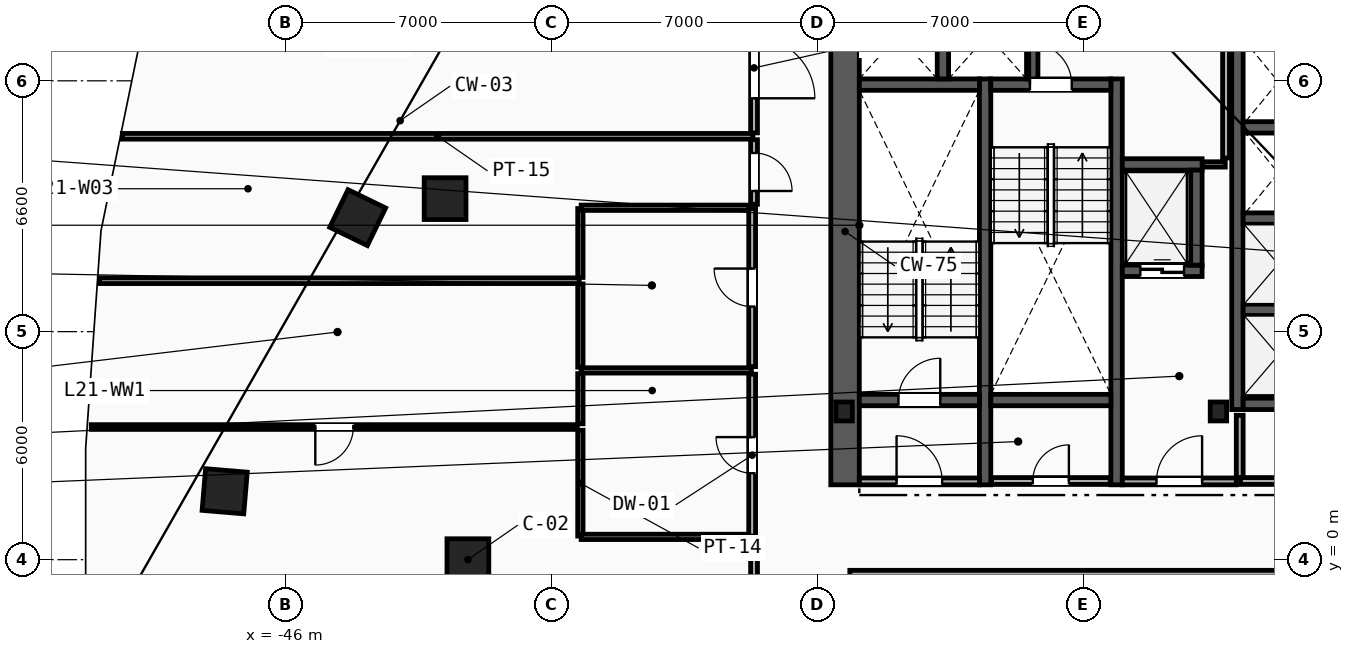
"""IFC4 building model, lengths in metres.
Left out: names, types, materials, properties, quantities, classifications, styles, units other than length and angle.
Written with IfcOpenShell. Run it as: python <this file> out.ifc"""

import sys

from ifc_helpers import new_model, si_unit, direction, frame, frame_2d, origin, origin_2d, place, context, subcontext, project, spatial, rectangle, i_section, extrude, element, fill, save


model = new_model("IFC4")
c1 = context("Model", 3, precision=1e-05, world=origin(), true_north=direction((0.0, 1.0)))
c2 = subcontext(c1, "Body", "Model", "MODEL_VIEW")
j1 = project(units=[si_unit("LENGTHUNIT", "METRE"), si_unit("PLANEANGLEUNIT", "RADIAN")], contexts=[c1])
p1 = place(None, origin())
s1 = spatial("IfcSite", under=j1, at=p1, CompositionType="ELEMENT")
p2 = place(p1, origin())
s2 = spatial("IfcBuilding", under=s1, at=p2, CompositionType="ELEMENT")
p3 = place(p2, frame((0.0, 0.0, 85.4)))
s3 = spatial("IfcBuildingStorey", under=s2, at=p3, CompositionType="ELEMENT", Elevation=85.4)
for number, where, z_axis, x_axis in (
    (1, (-31.3, 3.9, 0.0), (0.0, 0.0, 1.0), (1.0, 0.0, 0.0)),
    (2, (-21.45, 3.9, 0.0), (0.0, 0.0, 1.0), (1.0, 0.0, 0.0)),
):
    element("IfcColumn", number, at=place(p3, frame(where, z_axis=z_axis, x_axis=x_axis)), inside=s3, PredefinedType="COLUMN", context=c2, shape_type="SweptSolid", body=[
        extrude(i_section(OverallWidth=0.432, OverallDepth=0.498, WebThickness=0.056, FlangeThickness=0.089, FilletRadius=0.018, at=origin_2d()), origin(), (0.0, 0.0, 1.0), 3.6),
    ])
for number, where, z_axis, x_axis in (
    (3, (-41.2, 0.0, 0.0), (0.0, 0.0, 1.0), (1.0, 0.0, 0.0)),
    (4, (-41.8, 9.5, 0.0), (0.0, 0.0, 1.0), (1.0, 0.0, 0.0)),
    (5, (-44.1, 9.0, 0.0), (0.0, 0.0, 1.0), (-0.437, -0.899, 0.0)),
    (6, (-47.6, 1.8, 0.0), (0.0, 0.0, 1.0), (-0.084, -0.997, 0.0)),
):
    element("IfcColumn", number, at=place(p3, frame(where, z_axis=z_axis, x_axis=x_axis)), inside=s3, PredefinedType="COLUMN", context=c2, shape_type="SweptSolid", body=[
        extrude(rectangle(XDim=1.1, YDim=1.1, at=origin_2d()), origin(), (0.0, 0.0, 1.0), 3.6),
    ])
p4 = place(p3, frame((-31.275, 1.97, 0.0), z_axis=(0.0, 0.0, 1.0), x_axis=(0.0, 1.0, 0.0)))
e7 = element("IfcWall", 7, at=p4, inside=s3, PredefinedType="SHEAR", context=c2, shape_type="SweptSolid", body=[
    extrude(rectangle(XDim=13.33, YDim=0.75, at=frame_2d((6.665, 0.0))), origin(), (0.0, 0.0, 1.0), 3.3),
])
for number, where, z_axis, x_axis in (
    (8, (-27.59, 1.97, 0.0), (0.0, 0.0, 1.0), (0.0, 1.0, 0.0)),
    (9, (-24.13, 1.97, 0.0), (0.0, 0.0, 1.0), (0.0, 1.0, 0.0)),
):
    element("IfcWall", number, at=place(p3, frame(where, z_axis=z_axis, x_axis=x_axis)), inside=s3, PredefinedType="SHEAR", context=c2, shape_type="SweptSolid", body=[
        extrude(rectangle(XDim=10.68, YDim=0.3, at=frame_2d((5.34, 0.0))), origin(), (0.0, 0.0, 1.0), 3.3),
    ])
p5 = place(p3, frame((-30.9, 4.2, 0.0), z_axis=(0.0, 0.0, 1.0), x_axis=(1.0, 0.0, 0.0)))
e10 = element("IfcWall", 10, at=p5, inside=s3, PredefinedType="SHEAR", context=c2, shape_type="SweptSolid", body=[
    extrude(rectangle(XDim=3.16, YDim=0.3, at=frame_2d((1.58, 0.0))), origin(), (0.0, 0.0, 1.0), 3.3),
])
p6 = place(p5, frame((1.03, 0.0, 0.0)))
e11 = element("IfcOpeningElement", 11, at=p6, cuts=e10, PredefinedType="OPENING", context=c2, shape_type="SweptSolid", body=[
    extrude(rectangle(XDim=1.1, YDim=2.15, at=frame_2d((0.55, 1.075))), frame((0.0, 0.16, 0.0), z_axis=(0.0, -1.0, 0.0), x_axis=(1.0, 0.0, 0.0)), (0.0, 0.0, 1.0), 0.32),
])
p7 = place(p3, frame((-30.9, 12.5, 0.0), z_axis=(0.0, 0.0, 1.0), x_axis=(1.0, 0.0, 0.0)))
e12 = element("IfcWall", 12, at=p7, inside=s3, PredefinedType="SHEAR", context=c2, shape_type="SweptSolid", body=[
    extrude(rectangle(XDim=3.16, YDim=0.3, at=frame_2d((1.58, 0.0))), origin(), (0.0, 0.0, 1.0), 3.3),
])
p8 = place(p3, frame((-27.44, 12.5, 0.0), z_axis=(0.0, 0.0, 1.0), x_axis=(1.0, 0.0, 0.0)))
e13 = element("IfcWall", 13, at=p8, inside=s3, PredefinedType="SHEAR", context=c2, shape_type="SweptSolid", body=[
    extrude(rectangle(XDim=3.16, YDim=0.3, at=frame_2d((1.58, 0.0))), origin(), (0.0, 0.0, 1.0), 3.3),
])
p9 = place(p8, frame((1.03, 0.0, 0.0)))
e14 = element("IfcOpeningElement", 14, at=p9, cuts=e13, PredefinedType="OPENING", context=c2, shape_type="SweptSolid", body=[
    extrude(rectangle(XDim=1.1, YDim=2.15, at=frame_2d((0.55, 1.075))), frame((0.0, 0.16, 0.0), z_axis=(0.0, -1.0, 0.0), x_axis=(1.0, 0.0, 0.0)), (0.0, 0.0, 1.0), 0.32),
])
p10 = place(p3, frame((-27.44, 4.2, 0.0), z_axis=(0.0, 0.0, 1.0), x_axis=(1.0, 0.0, 0.0)))
e15 = element("IfcWall", 15, at=p10, inside=s3, PredefinedType="SHEAR", context=c2, shape_type="SweptSolid", body=[
    extrude(rectangle(XDim=3.16, YDim=0.3, at=frame_2d((1.58, 0.0))), origin(), (0.0, 0.0, 1.0), 3.3),
])
p11 = place(p3, frame((-20.89, 2.15, 0.0), z_axis=(0.0, 0.0, 1.0), x_axis=(0.0, 1.0, 0.0)))
e16 = element("IfcWall", 16, at=p11, inside=s3, PredefinedType="PARTITIONING", context=c2, shape_type="SweptSolid", body=[
    extrude(rectangle(XDim=1.65, YDim=0.18, at=frame_2d((0.825, 0.0))), origin(), (0.0, 0.0, 1.0), 3.3),
])
p12 = place(p3, frame((-23.98, 2.06, 0.0), z_axis=(0.0, 0.0, 1.0), x_axis=(1.0, 0.0, 0.0)))
e17 = element("IfcWall", 17, at=p12, inside=s3, PredefinedType="PARTITIONING", context=c2, shape_type="SweptSolid", body=[
    extrude(rectangle(XDim=3.0, YDim=0.18, at=frame_2d((1.5, 0.0))), origin(), (0.0, 0.0, 1.0), 3.3),
])
p13 = place(p12, frame((0.9, 0.0, 0.0)))
e18 = element("IfcOpeningElement", 18, at=p13, cuts=e17, PredefinedType="OPENING", context=c2, shape_type="SweptSolid", body=[
    extrude(rectangle(XDim=1.2, YDim=2.15, at=frame_2d((0.6, 1.075))), frame((0.0, 0.1, 0.0), z_axis=(0.0, -1.0, 0.0), x_axis=(1.0, 0.0, 0.0)), (0.0, 0.0, 1.0), 0.2),
])
p14 = place(p3, frame((-30.9, 2.06, 0.0), z_axis=(0.0, 0.0, 1.0), x_axis=(1.0, 0.0, 0.0)))
e19 = element("IfcWall", 19, at=p14, inside=s3, PredefinedType="PARTITIONING", context=c2, shape_type="SweptSolid", body=[
    extrude(rectangle(XDim=3.16, YDim=0.18, at=frame_2d((1.58, 0.0))), origin(), (0.0, 0.0, 1.0), 3.3),
])
p15 = place(p14, frame((0.98, 0.0, 0.0)))
e20 = element("IfcOpeningElement", 20, at=p15, cuts=e19, PredefinedType="OPENING", context=c2, shape_type="SweptSolid", body=[
    extrude(rectangle(XDim=1.2, YDim=2.15, at=frame_2d((0.6, 1.075))), frame((0.0, 0.1, 0.0), z_axis=(0.0, -1.0, 0.0), x_axis=(1.0, 0.0, 0.0)), (0.0, 0.0, 1.0), 0.2),
])
p16 = place(p3, frame((-23.98, 7.6, 0.0), z_axis=(0.0, 0.0, 1.0), x_axis=(1.0, 0.0, 0.0)))
e21 = element("IfcWall", 21, at=p16, inside=s3, PredefinedType="SHEAR", context=c2, shape_type="SweptSolid", body=[
    extrude(rectangle(XDim=2.1, YDim=0.3, at=frame_2d((1.05, 0.0))), origin(), (0.0, 0.0, 1.0), 3.3),
])
p17 = place(p16, frame((0.475, 0.0, 0.0)))
e22 = element("IfcOpeningElement", 22, at=p17, cuts=e21, PredefinedType="OPENING", context=c2, shape_type="SweptSolid", body=[
    extrude(rectangle(XDim=1.15, YDim=2.2, at=frame_2d((0.575, 1.1))), frame((0.0, 0.16, 0.0), z_axis=(0.0, -1.0, 0.0), x_axis=(1.0, 0.0, 0.0)), (0.0, 0.0, 1.0), 0.32),
])
p18 = place(p3, frame((-23.98, 10.4, 0.0), z_axis=(0.0, 0.0, 1.0), x_axis=(1.0, 0.0, 0.0)))
e23 = element("IfcWall", 23, at=p18, inside=s3, PredefinedType="SHEAR", context=c2, shape_type="SweptSolid", body=[
    extrude(rectangle(XDim=2.1, YDim=0.3, at=frame_2d((1.05, 0.0))), origin(), (0.0, 0.0, 1.0), 3.3),
])
p19 = place(p3, frame((-22.03, 7.75, 0.0), z_axis=(0.0, 0.0, 1.0), x_axis=(0.0, 1.0, 0.0)))
e24 = element("IfcWall", 24, at=p19, inside=s3, PredefinedType="SHEAR", context=c2, shape_type="SweptSolid", body=[
    extrude(rectangle(XDim=2.5, YDim=0.3, at=frame_2d((1.25, 0.0))), origin(), (0.0, 0.0, 1.0), 3.3),
])
for number, where, z_axis, x_axis in (
    (25, (-28.7, 12.65, 0.0), (0.0, 0.0, 1.0), (0.0, 1.0, 0.0)),
    (26, (-26.35, 12.65, 0.0), (0.0, 0.0, 1.0), (0.0, 1.0, 0.0)),
):
    element("IfcWall", number, at=place(p3, frame(where, z_axis=z_axis, x_axis=x_axis)), inside=s3, PredefinedType="SHEAR", context=c2, shape_type="SweptSolid", body=[
        extrude(rectangle(XDim=2.3, YDim=0.3, at=frame_2d((1.15, 0.0))), origin(), (0.0, 0.0, 1.0), 3.3),
    ])
p20 = place(p3, frame((-20.95, 3.95, 0.0), z_axis=(0.0, 0.0, 1.0), x_axis=(0.0, 1.0, 0.0)))
e27 = element("IfcWall", 27, at=p20, inside=s3, PredefinedType="SHEAR", context=c2, shape_type="SweptSolid", body=[
    extrude(rectangle(XDim=10.05, YDim=0.3, at=frame_2d((5.025, 0.0))), origin(), (0.0, 0.0, 1.0), 3.3),
])
p21 = place(p3, frame((-20.8, 4.1, 0.0), z_axis=(0.0, 0.0, 1.0), x_axis=(1.0, 0.0, 0.0)))
e28 = element("IfcWall", 28, at=p21, inside=s3, PredefinedType="SHEAR", context=c2, shape_type="SweptSolid", body=[
    extrude(rectangle(XDim=2.15, YDim=0.3, at=frame_2d((1.075, 0.0))), origin(), (0.0, 0.0, 1.0), 3.3),
])
for number, where, z_axis, x_axis in (
    (29, (-20.8, 6.575, 0.0), (0.0, 0.0, 1.0), (1.0, 0.0, 0.0)),
    (30, (-20.8, 8.975, 0.0), (0.0, 0.0, 1.0), (1.0, 0.0, 0.0)),
    (31, (-20.8, 11.375, 0.0), (0.0, 0.0, 1.0), (1.0, 0.0, 0.0)),
):
    element("IfcWall", number, at=place(p3, frame(where, z_axis=z_axis, x_axis=x_axis)), inside=s3, PredefinedType="SHEAR", context=c2, shape_type="SweptSolid", body=[
        extrude(rectangle(XDim=1.85, YDim=0.3, at=frame_2d((0.925, 0.0))), origin(), (0.0, 0.0, 1.0), 3.3),
    ])
p22 = place(p3, frame((-20.87, 2.07, 0.0), z_axis=(0.0, 0.0, 1.0), x_axis=(1.0, 0.0, 0.0)))
e32 = element("IfcWall", 32, at=p22, inside=s3, PredefinedType="PARTITIONING", context=c2, shape_type="SweptSolid", body=[
    extrude(rectangle(XDim=3.83, YDim=0.18, at=frame_2d((1.915, 0.0))), origin(), (0.0, 0.0, 1.0), 3.3),
])
p23 = place(p22, frame((1.44, 0.0, 0.0)))
e33 = element("IfcOpeningElement", 33, at=p23, cuts=e32, PredefinedType="OPENING", context=c2, shape_type="SweptSolid", body=[
    extrude(rectangle(XDim=0.95, YDim=2.1, at=frame_2d((0.475, 1.05))), frame((0.0, 0.1, 0.0), z_axis=(0.0, -1.0, 0.0), x_axis=(1.0, 0.0, 0.0)), (0.0, 0.0, 1.0), 0.2),
])
p24 = place(p3, frame((-21.86, 10.4, 0.0), z_axis=(0.0, 0.0, 1.0), x_axis=(1.0, 0.0, 0.0)))
e34 = element("IfcWall", 34, at=p24, inside=s3, PredefinedType="PARTITIONING", context=c2, shape_type="SweptSolid", body=[
    extrude(rectangle(XDim=0.59, YDim=0.14, at=frame_2d((0.295, 0.0))), origin(), (0.0, 0.0, 1.0), 3.3),
])
p25 = place(p3, frame((-21.25, 10.57, 0.0), z_axis=(0.0, 0.0, 1.0), x_axis=(0.0, 1.0, 0.0)))
e35 = element("IfcWall", 35, at=p25, inside=s3, PredefinedType="PARTITIONING", context=c2, shape_type="SweptSolid", body=[
    extrude(rectangle(XDim=4.36, YDim=0.18, at=frame_2d((2.18, 0.0))), origin(), (0.0, 0.0, 1.0), 3.3),
])
p26 = place(p3, frame((-27.42, 2.07, 0.0), z_axis=(0.0, 0.0, 1.0), x_axis=(1.0, 0.0, 0.0)))
e36 = element("IfcWall", 36, at=p26, inside=s3, PredefinedType="PARTITIONING", context=c2, shape_type="SweptSolid", body=[
    extrude(rectangle(XDim=3.12, YDim=0.18, at=frame_2d((1.56, 0.0))), origin(), (0.0, 0.0, 1.0), 3.3),
])
p27 = place(p26, frame((1.085, 0.0, 0.0)))
e37 = element("IfcOpeningElement", 37, at=p27, cuts=e36, PredefinedType="OPENING", context=c2, shape_type="SweptSolid", body=[
    extrude(rectangle(XDim=0.95, YDim=2.1, at=frame_2d((0.475, 1.05))), frame((0.0, 0.1, 0.0), z_axis=(0.0, -1.0, 0.0), x_axis=(1.0, 0.0, 0.0)), (0.0, 0.0, 1.0), 0.2),
])
p28 = place(p3, frame((-38.24, 0.62, 0.0), z_axis=(0.0, 0.0, 1.0), x_axis=(0.0, 1.0, 0.0)))
e38 = element("IfcWall", 38, at=p28, inside=s3, PredefinedType="PARTITIONING", context=c2, shape_type="SweptSolid", body=[
    extrude(rectangle(XDim=2.785, YDim=0.14, at=frame_2d((1.393, 0.0))), origin(), (0.0, 0.0, 1.0), 3.3),
])
p29 = place(p3, frame((-38.24, 3.575, 0.0), z_axis=(0.0, 0.0, 1.0), x_axis=(0.0, 1.0, 0.0)))
e39 = element("IfcWall", 39, at=p29, inside=s3, PredefinedType="PARTITIONING", context=c2, shape_type="SweptSolid", body=[
    extrude(rectangle(XDim=1.32, YDim=0.14, at=frame_2d((0.66, 0.0))), origin(), (0.0, 0.0, 1.0), 3.3),
])
p30 = place(p3, frame((-38.24, 5.065, 0.0), z_axis=(0.0, 0.0, 1.0), x_axis=(0.0, 1.0, 0.0)))
e40 = element("IfcWall", 40, at=p30, inside=s3, PredefinedType="PARTITIONING", context=c2, shape_type="SweptSolid", body=[
    extrude(rectangle(XDim=2.19, YDim=0.14, at=frame_2d((1.095, 0.0))), origin(), (0.0, 0.0, 1.0), 3.3),
])
p31 = place(p3, frame((-38.24, 7.425, 0.0), z_axis=(0.0, 0.0, 1.0), x_axis=(0.0, 1.0, 0.0)))
e41 = element("IfcWall", 41, at=p31, inside=s3, PredefinedType="PARTITIONING", context=c2, shape_type="SweptSolid", body=[
    extrude(rectangle(XDim=1.815, YDim=0.14, at=frame_2d((0.907, 0.0))), origin(), (0.0, 0.0, 1.0), 3.3),
])
for number, where, z_axis, x_axis in (
    (42, (-38.22, 0.6, 0.0), (0.0, 0.0, 1.0), (1.0, 0.0, 0.0)),
    (43, (-38.22, 4.98, 0.0), (0.0, 0.0, 1.0), (1.0, 0.0, 0.0)),
    (44, (-38.22, 9.26, 0.0), (0.0, 0.0, 1.0), (1.0, 0.0, 0.0)),
):
    element("IfcWall", number, at=place(p3, frame(where, z_axis=z_axis, x_axis=x_axis)), inside=s3, PredefinedType="PARTITIONING", context=c2, shape_type="SweptSolid", body=[
        extrude(rectangle(XDim=4.48, YDim=0.14, at=frame_2d((2.24, 0.0))), origin(), (0.0, 0.0, 1.0), 3.3),
    ])
p32 = place(p3, frame((-33.72, 0.62, 0.0), z_axis=(0.0, 0.0, 1.0), x_axis=(0.0, 1.0, 0.0)))
e45 = element("IfcWall", 45, at=p32, inside=s3, PredefinedType="PARTITIONING", context=c2, shape_type="SweptSolid", body=[
    extrude(rectangle(XDim=4.26, YDim=0.18, at=frame_2d((2.13, 0.0))), origin(), (0.0, 0.0, 1.0), 3.3),
])
p33 = place(p32, frame((1.655, 0.0, 0.0)))
e46 = element("IfcOpeningElement", 46, at=p33, cuts=e45, PredefinedType="OPENING", context=c2, shape_type="SweptSolid", body=[
    extrude(rectangle(XDim=0.95, YDim=2.1, at=frame_2d((0.475, 1.05))), frame((0.0, 0.1, 0.0), z_axis=(0.0, -1.0, 0.0), x_axis=(1.0, 0.0, 0.0)), (0.0, 0.0, 1.0), 0.2),
])
p34 = place(p3, frame((-33.72, 5.08, 0.0), z_axis=(0.0, 0.0, 1.0), x_axis=(0.0, 1.0, 0.0)))
e47 = element("IfcWall", 47, at=p34, inside=s3, PredefinedType="PARTITIONING", context=c2, shape_type="SweptSolid", body=[
    extrude(rectangle(XDim=4.16, YDim=0.18, at=frame_2d((2.08, 0.0))), origin(), (0.0, 0.0, 1.0), 3.3),
])
p35 = place(p34, frame((1.58, 0.0, 0.0)))
e48 = element("IfcOpeningElement", 48, at=p35, cuts=e47, PredefinedType="OPENING", context=c2, shape_type="SweptSolid", body=[
    extrude(rectangle(XDim=1.0, YDim=2.15, at=frame_2d((0.5, 1.075))), frame((0.0, 0.1, 0.0), z_axis=(0.0, -1.0, 0.0), x_axis=(1.0, 0.0, 0.0)), (0.0, 0.0, 1.0), 0.2),
])
p36 = place(p3, frame((-50.897, 7.34, 0.0), z_axis=(0.0, 0.0, 1.0), x_axis=(1.0, 0.0, 0.0)))
e49 = element("IfcWall", 49, at=p36, inside=s3, PredefinedType="PARTITIONING", context=c2, shape_type="SweptSolid", body=[
    extrude(rectangle(XDim=12.627, YDim=0.15, at=frame_2d((6.314, 0.0))), origin(), (0.0, 0.0, 1.0), 3.3),
])
p37 = place(p3, frame((-50.293, 11.14, 0.0), z_axis=(0.0, 0.0, 1.0), x_axis=(1.0, 0.0, 0.0)))
e50 = element("IfcWall", 50, at=p37, inside=s3, PredefinedType="PARTITIONING", context=c2, shape_type="SweptSolid", body=[
    extrude(rectangle(XDim=16.593, YDim=0.15, at=frame_2d((8.296, 0.0))), origin(), (0.0, 0.0, 1.0), 3.3),
])
p38 = place(p3, frame((-31.15, -0.37, 0.0), z_axis=(0.0, 0.0, 1.0), x_axis=(1.0, 0.0, 0.0)))
e51 = element("IfcWall", 51, at=p38, inside=s3, PredefinedType="PARTITIONING", context=c2, shape_type="SweptSolid", body=[
    extrude(rectangle(XDim=14.328, YDim=0.18, at=frame_2d((7.164, 0.0))), origin(), (0.0, 0.0, 1.0), 3.3),
])
p39 = place(p3, frame((-33.67, 0.509, 0.0), z_axis=(0.0, 0.0, 1.0), x_axis=(0.0, -1.0, 0.0)))
e52 = element("IfcWall", 52, at=p39, inside=s3, PredefinedType="PARTITIONING", context=c2, shape_type="SweptSolid", body=[
    extrude(rectangle(XDim=11.908, YDim=0.18, at=frame_2d((5.954, 0.0))), origin(), (0.0, 0.0, 1.0), 3.3),
])
p40 = place(p3, frame((-33.67, 11.05, 0.0), z_axis=(0.0, 0.0, 1.0), x_axis=(0.0, -1.0, 0.0)))
e53 = element("IfcWall", 53, at=p40, inside=s3, PredefinedType="PARTITIONING", context=c2, shape_type="SweptSolid", body=[
    extrude(rectangle(XDim=1.699, YDim=0.18, at=frame_2d((0.849, 0.0))), origin(), (0.0, 0.0, 1.0), 3.3),
])
p41 = place(p40, frame((0.349, 0.0, 0.0)))
e54 = element("IfcOpeningElement", 54, at=p41, cuts=e53, PredefinedType="OPENING", context=c2, shape_type="SweptSolid", body=[
    extrude(rectangle(XDim=1.0, YDim=2.15, at=frame_2d((0.5, 1.075))), frame((0.0, 0.1, 0.0), z_axis=(0.0, -1.0, 0.0), x_axis=(1.0, 0.0, 0.0)), (0.0, 0.0, 1.0), 0.2),
])
p42 = place(p3, frame((-33.67, 14.65, 0.0), z_axis=(0.0, 0.0, 1.0), x_axis=(0.0, -1.0, 0.0)))
e55 = element("IfcWall", 55, at=p42, inside=s3, PredefinedType="PARTITIONING", context=c2, shape_type="SweptSolid", body=[
    extrude(rectangle(XDim=3.42, YDim=0.18, at=frame_2d((1.71, 0.0))), origin(), (0.0, 0.0, 1.0), 3.3),
])
p43 = place(p42, frame((0.91, 0.0, 0.0)))
e56 = element("IfcOpeningElement", 56, at=p43, cuts=e55, PredefinedType="OPENING", context=c2, shape_type="SweptSolid", body=[
    extrude(rectangle(XDim=1.6, YDim=2.2, at=frame_2d((0.8, 1.1))), frame((0.0, 0.1, 0.0), z_axis=(0.0, -1.0, 0.0), x_axis=(1.0, 0.0, 0.0)), (0.0, 0.0, 1.0), 0.2),
])
p44 = place(p3, frame((-38.32, 3.49, 0.0), z_axis=(0.0, 0.0, 1.0), x_axis=(-1.0, 0.0, 0.0)))
e57 = element("IfcWall", 57, at=p44, inside=s3, PredefinedType="PARTITIONING", context=c2, shape_type="SweptSolid", body=[
    extrude(rectangle(XDim=12.79, YDim=0.125, at=frame_2d((6.395, 0.0))), origin(), (0.0, 0.0, 1.0), 3.3),
])
p45 = place(p44, frame((5.895, 0.0, 0.0)))
e58 = element("IfcOpeningElement", 58, at=p45, cuts=e57, PredefinedType="OPENING", context=c2, shape_type="SweptSolid", body=[
    extrude(rectangle(XDim=1.0, YDim=2.15, at=frame_2d((0.5, 1.075))), frame((0.0, 0.073, 0.0), z_axis=(0.0, -1.0, 0.0), x_axis=(1.0, 0.0, 0.0)), (0.0, 0.0, 1.0), 0.145),
])
p46 = place(p6, origin())
e59 = element("IfcDoor", 59, at=p46, inside=s3, OperationType="SINGLE_SWING_RIGHT", PredefinedType="DOOR", context=c2, shape_type="SweptSolid", body=[
    extrude(rectangle(XDim=1.1, YDim=2.15, at=frame_2d((0.55, 1.075))), frame((0.0, 0.025, 0.0), z_axis=(0.0, -1.0, 0.0), x_axis=(1.0, 0.0, 0.0)), (0.0, 0.0, 1.0), 0.05),
])
fill(e11, e59)
p47 = place(p9, origin())
e60 = element("IfcDoor", 60, at=p47, inside=s3, OperationType="SINGLE_SWING_LEFT", PredefinedType="DOOR", context=c2, shape_type="SweptSolid", body=[
    extrude(rectangle(XDim=1.1, YDim=2.15, at=frame_2d((0.55, 1.075))), frame((0.0, 0.025, 0.0), z_axis=(0.0, -1.0, 0.0), x_axis=(1.0, 0.0, 0.0)), (0.0, 0.0, 1.0), 0.05),
])
fill(e14, e60)
p48 = place(p13, origin())
e61 = element("IfcDoor", 61, at=p48, inside=s3, OperationType="SINGLE_SWING_RIGHT", PredefinedType="DOOR", context=c2, shape_type="SweptSolid", body=[
    extrude(rectangle(XDim=1.2, YDim=2.15, at=frame_2d((0.6, 1.075))), frame((0.0, 0.025, 0.0), z_axis=(0.0, -1.0, 0.0), x_axis=(1.0, 0.0, 0.0)), (0.0, 0.0, 1.0), 0.05),
])
fill(e18, e61)
p49 = place(p15, origin())
e62 = element("IfcDoor", 62, at=p49, inside=s3, OperationType="SINGLE_SWING_LEFT", PredefinedType="DOOR", context=c2, shape_type="SweptSolid", body=[
    extrude(rectangle(XDim=1.2, YDim=2.15, at=frame_2d((0.6, 1.075))), frame((0.0, 0.025, 0.0), z_axis=(0.0, -1.0, 0.0), x_axis=(1.0, 0.0, 0.0)), (0.0, 0.0, 1.0), 0.05),
])
fill(e20, e62)
p50 = place(p17, origin())
e63 = element("IfcDoor", 63, at=p50, inside=s3, OperationType="SLIDING_TO_LEFT", PredefinedType="TRAPDOOR", context=c2, shape_type="SweptSolid", body=[
    extrude(rectangle(XDim=1.15, YDim=2.2, at=frame_2d((0.575, 1.1))), frame((0.0, 0.025, 0.0), z_axis=(0.0, -1.0, 0.0), x_axis=(1.0, 0.0, 0.0)), (0.0, 0.0, 1.0), 0.05),
])
fill(e22, e63)
p51 = place(p45, origin())
e64 = element("IfcDoor", 64, at=p51, inside=s3, OperationType="SINGLE_SWING_RIGHT", PredefinedType="DOOR", context=c2, shape_type="SweptSolid", body=[
    extrude(rectangle(XDim=1.0, YDim=2.15, at=frame_2d((0.5, 1.075))), frame((0.0, 0.025, 0.0), z_axis=(0.0, -1.0, 0.0), x_axis=(1.0, 0.0, 0.0)), (0.0, 0.0, 1.0), 0.05),
])
fill(e58, e64)
p52 = place(p33, origin())
e65 = element("IfcDoor", 65, at=p52, inside=s3, OperationType="SINGLE_SWING_RIGHT", PredefinedType="DOOR", context=c2, shape_type="SweptSolid", body=[
    extrude(rectangle(XDim=0.95, YDim=2.1, at=frame_2d((0.475, 1.05))), frame((0.0, 0.025, 0.0), z_axis=(0.0, -1.0, 0.0), x_axis=(1.0, 0.0, 0.0)), (0.0, 0.0, 1.0), 0.05),
])
fill(e46, e65)
p53 = place(p35, origin())
e66 = element("IfcDoor", 66, at=p53, inside=s3, OperationType="SINGLE_SWING_RIGHT", PredefinedType="DOOR", context=c2, shape_type="SweptSolid", body=[
    extrude(rectangle(XDim=1.0, YDim=2.15, at=frame_2d((0.5, 1.075))), frame((0.0, 0.025, 0.0), z_axis=(0.0, -1.0, 0.0), x_axis=(1.0, 0.0, 0.0)), (0.0, 0.0, 1.0), 0.05),
])
fill(e48, e66)
p54 = place(p43, origin())
e67 = element("IfcDoor", 67, at=p54, inside=s3, OperationType="SINGLE_SWING_RIGHT", PredefinedType="DOOR", context=c2, shape_type="SweptSolid", body=[
    extrude(rectangle(XDim=1.6, YDim=2.2, at=frame_2d((0.8, 1.1))), frame((0.0, 0.025, 0.0), z_axis=(0.0, -1.0, 0.0), x_axis=(1.0, 0.0, 0.0)), (0.0, 0.0, 1.0), 0.05),
])
fill(e56, e67)
p55 = place(p27, origin())
e68 = element("IfcDoor", 68, at=p55, inside=s3, OperationType="SINGLE_SWING_RIGHT", PredefinedType="DOOR", context=c2, shape_type="SweptSolid", body=[
    extrude(rectangle(XDim=0.95, YDim=2.1, at=frame_2d((0.475, 1.05))), frame((0.0, 0.025, 0.0), z_axis=(0.0, -1.0, 0.0), x_axis=(1.0, 0.0, 0.0)), (0.0, 0.0, 1.0), 0.05),
])
fill(e37, e68)
p56 = place(p41, origin())
e69 = element("IfcDoor", 69, at=p56, inside=s3, OperationType="SINGLE_SWING_RIGHT", PredefinedType="DOOR", context=c2, shape_type="SweptSolid", body=[
    extrude(rectangle(XDim=1.0, YDim=2.15, at=frame_2d((0.5, 1.075))), frame((0.0, 0.025, 0.0), z_axis=(0.0, -1.0, 0.0), x_axis=(1.0, 0.0, 0.0)), (0.0, 0.0, 1.0), 0.05),
])
fill(e54, e69)
save(model, sys.argv[1])
